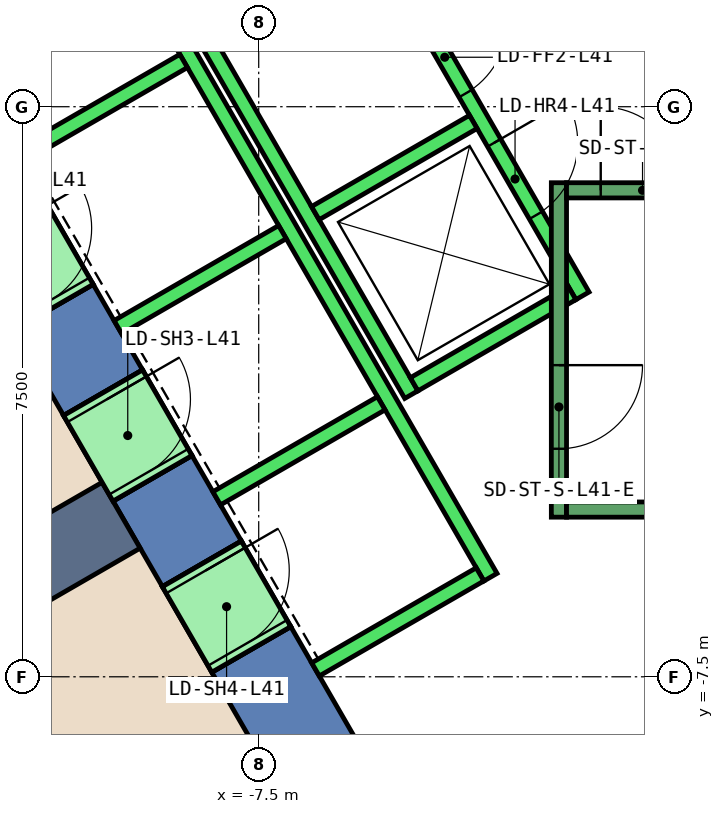
"""IFC4 building model, lengths in metres.
Left out: names, types, materials, properties, quantities, classifications, styles, units other than length and angle.
Written with IfcOpenShell. Run it as: python <this file> out.ifc"""

import sys

from ifc_helpers import new_model, si_unit, direction, frame, frame_2d, origin, place, context, subcontext, project, spatial, polyline, rectangle, outline, extrude, element, fill, save


model = new_model("IFC4")
c1 = context("Model", 3, precision=1e-05, world=origin(), true_north=direction((0.0, 1.0)))
c2 = subcontext(c1, "Body", "Model", "MODEL_VIEW")
j1 = project(units=[si_unit("LENGTHUNIT", "METRE"), si_unit("PLANEANGLEUNIT", "RADIAN")], contexts=[c1])
p1 = place(None, origin())
s1 = spatial("IfcSite", under=j1, at=p1, CompositionType="ELEMENT")
p2 = place(p1, origin())
s2 = spatial("IfcBuilding", under=s1, at=p2, CompositionType="ELEMENT")
p3 = place(p2, frame((0.0, 0.0, 184.4)))
s3 = spatial("IfcBuildingStorey", under=s2, at=p3, CompositionType="ELEMENT", Elevation=184.4)
p4 = place(p3, frame((0.0, 0.0, -0.6)))
e1 = element("IfcWall", 1, at=p4, inside=s3, PredefinedType="SHEAR", context=c2, shape_type="SweptSolid", body=[
    extrude(outline(polyline([(-10.067, -4.063), (-9.028, -3.463), (-9.678, -2.337), (-10.717, -2.937), (-10.067, -4.063)])), origin(), (0.0, 0.0, 1.0), 5.4),
])
p5 = place(p3, frame((0.0, 0.0, -0.6)))
e2 = element("IfcWall", 2, at=p5, inside=s3, PredefinedType="SHEAR", context=c2, shape_type="SweptSolid", body=[
    extrude(outline(polyline([(-8.767, -6.314), (-7.728, -5.714), (-8.378, -4.589), (-9.417, -5.189), (-8.767, -6.314)])), origin(), (0.0, 0.0, 1.0), 5.4),
])
p6 = place(p3, frame((0.0, 0.0, -0.6)))
e3 = element("IfcWall", 3, at=p6, inside=s3, PredefinedType="SHEAR", context=c2, shape_type="SweptSolid", body=[
    extrude(outline(polyline([(-7.078, -6.84), (-8.117, -7.44), (-6.928, -9.5), (-6.235, -8.3), (-7.078, -6.84)])), origin(), (0.0, 0.0, 1.0), 5.4),
])
p7 = place(p3, frame((0.0, 0.0, 3.6)))
e4 = element("IfcWall", 4, at=p7, inside=s3, PredefinedType="SHEAR", context=c2, shape_type="SweptSolid", body=[
    extrude(outline(polyline([(-10.717, -2.937), (-9.678, -2.337), (-10.328, -1.211), (-11.367, -1.811), (-10.717, -2.937)])), origin(), (0.0, 0.0, 1.0), 1.2),
])
p8 = place(p3, frame((0.0, 0.0, 3.6)))
e5 = element("IfcWall", 5, at=p8, inside=s3, PredefinedType="SHEAR", context=c2, shape_type="SweptSolid", body=[
    extrude(outline(polyline([(-9.417, -5.189), (-8.378, -4.589), (-9.028, -3.463), (-10.067, -4.063), (-9.417, -5.189)])), origin(), (0.0, 0.0, 1.0), 1.2),
])
p9 = place(p3, frame((0.0, 0.0, 3.6)))
e6 = element("IfcWall", 6, at=p9, inside=s3, PredefinedType="SHEAR", context=c2, shape_type="SweptSolid", body=[
    extrude(outline(polyline([(-8.117, -7.44), (-7.078, -6.84), (-7.728, -5.714), (-8.767, -6.314), (-8.117, -7.44)])), origin(), (0.0, 0.0, 1.0), 1.2),
])
p10 = place(p3, frame((-9.31, -5.375, 0.0), z_axis=(0.0, 0.0, 1.0), x_axis=(-0.866015103238, -0.500017840646, 0.0)))
e7 = element("IfcWall", 7, at=p10, inside=s3, PredefinedType="SHEAR", context=c2, shape_type="SweptSolid", body=[
    extrude(rectangle(XDim=27.139, YDim=1.0, at=frame_2d((13.57, 0.0))), origin(), (0.0, 0.0, 1.0), 4.8),
])
p11 = place(p3, frame((-2.54, 5.1, 0.0), z_axis=(0.0, 0.0, 1.0), x_axis=(0.499925051871, -0.866068670783, 0.0)))
e8 = element("IfcWall", 8, at=p11, inside=s3, PredefinedType="PARTITIONING", context=c2, shape_type="SweptSolid", body=[
    extrude(rectangle(XDim=5.181, YDim=0.2, at=frame_2d((2.59, 0.0))), origin(), (0.0, 0.0, 1.0), 4.8),
])
p12 = place(p11, frame((2.04, 0.0, 0.0)))
e9 = element("IfcOpeningElement", 9, at=p12, cuts=e8, PredefinedType="OPENING", context=c2, shape_type="SweptSolid", body=[
    extrude(rectangle(XDim=1.0, YDim=2.1, at=frame_2d((0.5, 1.05))), frame((0.0, 0.11, 0.0), z_axis=(0.0, -1.0, 0.0), x_axis=(1.0, 0.0, 0.0)), (0.0, 0.0, 1.0), 0.22),
])
p13 = place(p3, frame((-5.94, 2.188, 0.0), z_axis=(0.0, 0.0, 1.0), x_axis=(0.500034260056, -0.866005622828, 0.0)))
e10 = element("IfcWall", 10, at=p13, inside=s3, PredefinedType="STANDARD", context=c2, shape_type="SweptSolid", body=[
    extrude(rectangle(XDim=5.399, YDim=0.2, at=frame_2d((2.7, 0.0))), origin(), (0.0, 0.0, 1.0), 4.8),
])
p14 = place(p13, frame((3.075, 0.0, 0.0)))
e11 = element("IfcOpeningElement", 11, at=p14, cuts=e10, PredefinedType="OPENING", context=c2, shape_type="SweptSolid", body=[
    extrude(rectangle(XDim=1.1, YDim=2.1, at=frame_2d((0.55, 1.05))), frame((0.0, 0.11, 0.0), z_axis=(0.0, -1.0, 0.0), x_axis=(1.0, 0.0, 0.0)), (0.0, 0.0, 1.0), 0.22),
])
p15 = place(p13, frame((1.225, 0.0, 0.0)))
e12 = element("IfcOpeningElement", 12, at=p15, cuts=e10, PredefinedType="OPENING", context=c2, shape_type="SweptSolid", body=[
    extrude(rectangle(XDim=1.1, YDim=2.1, at=frame_2d((0.55, 1.05))), frame((0.0, 0.11, 0.0), z_axis=(0.0, -1.0, 0.0), x_axis=(1.0, 0.0, 0.0)), (0.0, 0.0, 1.0), 0.22),
])
p16 = place(p3, frame((-8.192, 0.888, 0.0), z_axis=(0.0, 0.0, 1.0), x_axis=(0.500034260056, -0.866005622828, 0.0)))
e13 = element("IfcWall", 13, at=p16, inside=s3, PredefinedType="STANDARD", context=c2, shape_type="SweptSolid", body=[
    extrude(rectangle(XDim=5.399, YDim=0.2, at=frame_2d((2.7, 0.0))), origin(), (0.0, 0.0, 1.0), 4.8),
])
p17 = place(p3, frame((-4.677, -0.2, 0.0), z_axis=(0.0, 0.0, 1.0), x_axis=(-0.865973769406, -0.500089422704, 0.0)))
e14 = element("IfcWall", 14, at=p17, inside=s3, PredefinedType="STANDARD", context=c2, shape_type="SweptSolid", body=[
    extrude(rectangle(XDim=2.399, YDim=0.2, at=frame_2d((1.2, 0.0))), origin(), (0.0, 0.0, 1.0), 4.8),
])
p18 = place(p3, frame((-3.377, -2.452, 0.0), z_axis=(0.0, 0.0, 1.0), x_axis=(-0.865955154139, -0.50012165622, 0.0)))
e15 = element("IfcWall", 15, at=p18, inside=s3, PredefinedType="STANDARD", context=c2, shape_type="SweptSolid", body=[
    extrude(rectangle(XDim=2.4, YDim=0.2, at=frame_2d((1.2, 0.0))), origin(), (0.0, 0.0, 1.0), 4.8),
])
p19 = place(p3, frame((-9.751, 2.99, 0.0), z_axis=(0.0, 0.0, 1.0), x_axis=(0.50000090737, -0.866024879913, 0.0)))
e16 = element("IfcWall", 16, at=p19, inside=s3, PredefinedType="STANDARD", context=c2, shape_type="SweptSolid", body=[
    extrude(rectangle(XDim=10.6, YDim=0.2, at=frame_2d((5.3, 0.0))), origin(), (0.0, 0.0, 1.0), 4.8),
])
for number, where, z_axis, x_axis in (
    (17, (-8.488, 0.602, 0.0), (0.0, 0.0, 1.0), (-0.866, -0.5, 0.0)),
    (18, (-7.188, -1.65, 0.0), (0.0, 0.0, 1.0), (-0.866, -0.5, 0.0)),
    (19, (-5.888, -3.902, 0.0), (0.0, 0.0, 1.0), (-0.866, -0.5, 0.0)),
    (20, (-4.588, -6.153, 0.0), (0.0, 0.0, 1.0), (-0.866, -0.5, 0.0)),
):
    element("IfcWall", number, at=place(p3, frame(where, z_axis=z_axis, x_axis=x_axis)), inside=s3, PredefinedType="STANDARD", context=c2, shape_type="SweptSolid", body=[
        extrude(rectangle(XDim=2.5, YDim=0.2, at=frame_2d((1.25, 0.0))), origin(), (0.0, 0.0, 1.0), 4.8),
    ])
p20 = place(p3, frame((-10.848, -1.511, 0.0), z_axis=(0.0, 0.0, 1.0), x_axis=(0.49989585183, -0.866085525409, 0.0)))
e21 = element("IfcWall", 21, at=p20, inside=s3, PredefinedType="STANDARD", context=c2, shape_type="SweptSolid", body=[
    extrude(rectangle(XDim=1.3, YDim=1.2, at=frame_2d((0.65, 0.0))), origin(), (0.0, 0.0, 1.0), 2.4),
])
p21 = place(p20, frame((0.1, 0.0, 0.0)))
e22 = element("IfcOpeningElement", 22, at=p21, cuts=e21, PredefinedType="OPENING", context=c2, shape_type="SweptSolid", body=[
    extrude(rectangle(XDim=1.1, YDim=2.3, at=frame_2d((0.55, 1.15))), frame((0.0, 0.61, 0.0), z_axis=(0.0, -1.0, 0.0), x_axis=(1.0, 0.0, 0.0)), (0.0, 0.0, 1.0), 1.22),
])
p22 = place(p3, frame((-9.548, -3.763, 0.0), z_axis=(0.0, 0.0, 1.0), x_axis=(0.500036693733, -0.866004217611, 0.0)))
e23 = element("IfcWall", 23, at=p22, inside=s3, PredefinedType="STANDARD", context=c2, shape_type="SweptSolid", body=[
    extrude(rectangle(XDim=1.3, YDim=1.2, at=frame_2d((0.65, 0.0))), origin(), (0.0, 0.0, 1.0), 2.4),
])
p23 = place(p22, frame((0.1, 0.0, 0.0)))
e24 = element("IfcOpeningElement", 24, at=p23, cuts=e23, PredefinedType="OPENING", context=c2, shape_type="SweptSolid", body=[
    extrude(rectangle(XDim=1.1, YDim=2.3, at=frame_2d((0.55, 1.15))), frame((0.0, 0.61, 0.0), z_axis=(0.0, -1.0, 0.0), x_axis=(1.0, 0.0, 0.0)), (0.0, 0.0, 1.0), 1.22),
])
p24 = place(p3, frame((-8.248, -6.015, 0.0), z_axis=(0.0, 0.0, 1.0), x_axis=(0.500362116554, -0.865816234728, 0.0)))
e25 = element("IfcWall", 25, at=p24, inside=s3, PredefinedType="STANDARD", context=c2, shape_type="SweptSolid", body=[
    extrude(rectangle(XDim=1.299, YDim=1.2, at=frame_2d((0.65, 0.0))), origin(), (0.0, 0.0, 1.0), 2.4),
])
p25 = place(p24, frame((0.1, 0.0, 0.0)))
e26 = element("IfcOpeningElement", 26, at=p25, cuts=e25, PredefinedType="OPENING", context=c2, shape_type="SweptSolid", body=[
    extrude(rectangle(XDim=1.1, YDim=2.3, at=frame_2d((0.55, 1.15))), frame((0.0, 0.61, 0.0), z_axis=(0.0, -1.0, 0.0), x_axis=(1.0, 0.0, 0.0)), (0.0, 0.0, 1.0), 1.22),
])
p26 = place(p3, frame((-3.55, -1.0, 0.0), z_axis=(0.0, 0.0, 1.0), x_axis=(0.0, -1.0, 0.0)))
e27 = element("IfcWall", 27, at=p26, inside=s3, PredefinedType="STANDARD", context=c2, shape_type="SweptSolid", body=[
    extrude(rectangle(XDim=4.4, YDim=0.2, at=frame_2d((2.2, 0.0))), origin(), (0.0, 0.0, 1.0), 4.8),
])
p27 = place(p26, frame((2.4, 0.0, 0.0)))
e28 = element("IfcOpeningElement", 28, at=p27, cuts=e27, PredefinedType="OPENING", context=c2, shape_type="SweptSolid", body=[
    extrude(rectangle(XDim=1.1, YDim=2.2, at=frame_2d((0.55, 1.1))), frame((0.0, 0.11, 0.0), z_axis=(0.0, -1.0, 0.0), x_axis=(1.0, 0.0, 0.0)), (0.0, 0.0, 1.0), 0.22),
])
p28 = place(p3, frame((-3.45, -1.1, 0.0), z_axis=(0.0, 0.0, 1.0), x_axis=(1.0, 0.0, 0.0)))
e29 = element("IfcWall", 29, at=p28, inside=s3, PredefinedType="STANDARD", context=c2, shape_type="SweptSolid", body=[
    extrude(rectangle(XDim=6.9, YDim=0.2, at=frame_2d((3.45, 0.0))), origin(), (0.0, 0.0, 1.0), 4.8),
])
p29 = place(p28, frame((0.45, 0.0, 0.0)))
e30 = element("IfcOpeningElement", 30, at=p29, cuts=e29, PredefinedType="OPENING", context=c2, shape_type="SweptSolid", body=[
    extrude(rectangle(XDim=1.1, YDim=2.2, at=frame_2d((0.55, 1.1))), frame((0.0, 0.11, 0.0), z_axis=(0.0, -1.0, 0.0), x_axis=(1.0, 0.0, 0.0)), (0.0, 0.0, 1.0), 0.22),
])
p30 = place(p3, frame((-3.45, -5.3, 0.0), z_axis=(0.0, 0.0, 1.0), x_axis=(1.0, 0.0, 0.0)))
e31 = element("IfcWall", 31, at=p30, inside=s3, PredefinedType="STANDARD", context=c2, shape_type="SweptSolid", body=[
    extrude(rectangle(XDim=6.9, YDim=0.2, at=frame_2d((3.45, 0.0))), origin(), (0.0, 0.0, 1.0), 4.8),
])
p31 = place(p23, origin())
e32 = element("IfcDoor", 32, at=p31, inside=s3, OperationType="SLIDING_TO_LEFT", PredefinedType="DOOR", context=c2, shape_type="SweptSolid", body=[
    extrude(rectangle(XDim=1.1, YDim=2.3, at=frame_2d((0.55, 1.15))), frame((0.0, 0.025, 0.0), z_axis=(0.0, -1.0, 0.0), x_axis=(1.0, 0.0, 0.0)), (0.0, 0.0, 1.0), 0.05),
])
fill(e24, e32)
p32 = place(p25, origin())
e33 = element("IfcDoor", 33, at=p32, inside=s3, OperationType="SLIDING_TO_LEFT", PredefinedType="DOOR", context=c2, shape_type="SweptSolid", body=[
    extrude(rectangle(XDim=1.1, YDim=2.3, at=frame_2d((0.55, 1.15))), frame((0.0, 0.025, 0.0), z_axis=(0.0, -1.0, 0.0), x_axis=(1.0, 0.0, 0.0)), (0.0, 0.0, 1.0), 0.05),
])
fill(e26, e33)
p33 = place(p14, origin())
e34 = element("IfcDoor", 34, at=p33, inside=s3, OperationType="SLIDING_TO_LEFT", PredefinedType="DOOR", context=c2, shape_type="SweptSolid", body=[
    extrude(rectangle(XDim=1.1, YDim=2.1, at=frame_2d((0.55, 1.05))), frame((0.0, 0.025, 0.0), z_axis=(0.0, -1.0, 0.0), x_axis=(1.0, 0.0, 0.0)), (0.0, 0.0, 1.0), 0.05),
])
fill(e11, e34)
p34 = place(p15, origin())
e35 = element("IfcDoor", 35, at=p34, inside=s3, OperationType="SLIDING_TO_LEFT", PredefinedType="DOOR", context=c2, shape_type="SweptSolid", body=[
    extrude(rectangle(XDim=1.1, YDim=2.1, at=frame_2d((0.55, 1.05))), frame((0.0, 0.025, 0.0), z_axis=(0.0, -1.0, 0.0), x_axis=(1.0, 0.0, 0.0)), (0.0, 0.0, 1.0), 0.05),
])
fill(e12, e35)
p35 = place(p29, origin())
e36 = element("IfcDoor", 36, at=p35, inside=s3, OperationType="SINGLE_SWING_LEFT", PredefinedType="DOOR", context=c2, shape_type="SweptSolid", body=[
    extrude(rectangle(XDim=1.1, YDim=2.2, at=frame_2d((0.55, 1.1))), frame((0.0, 0.025, 0.0), z_axis=(0.0, -1.0, 0.0), x_axis=(1.0, 0.0, 0.0)), (0.0, 0.0, 1.0), 0.05),
])
fill(e30, e36)
p36 = place(p27, origin())
e37 = element("IfcDoor", 37, at=p36, inside=s3, OperationType="SINGLE_SWING_LEFT", PredefinedType="DOOR", context=c2, shape_type="SweptSolid", body=[
    extrude(rectangle(XDim=1.1, YDim=2.2, at=frame_2d((0.55, 1.1))), frame((0.0, 0.025, 0.0), z_axis=(0.0, -1.0, 0.0), x_axis=(1.0, 0.0, 0.0)), (0.0, 0.0, 1.0), 0.05),
])
fill(e28, e37)
save(model, sys.argv[1])
